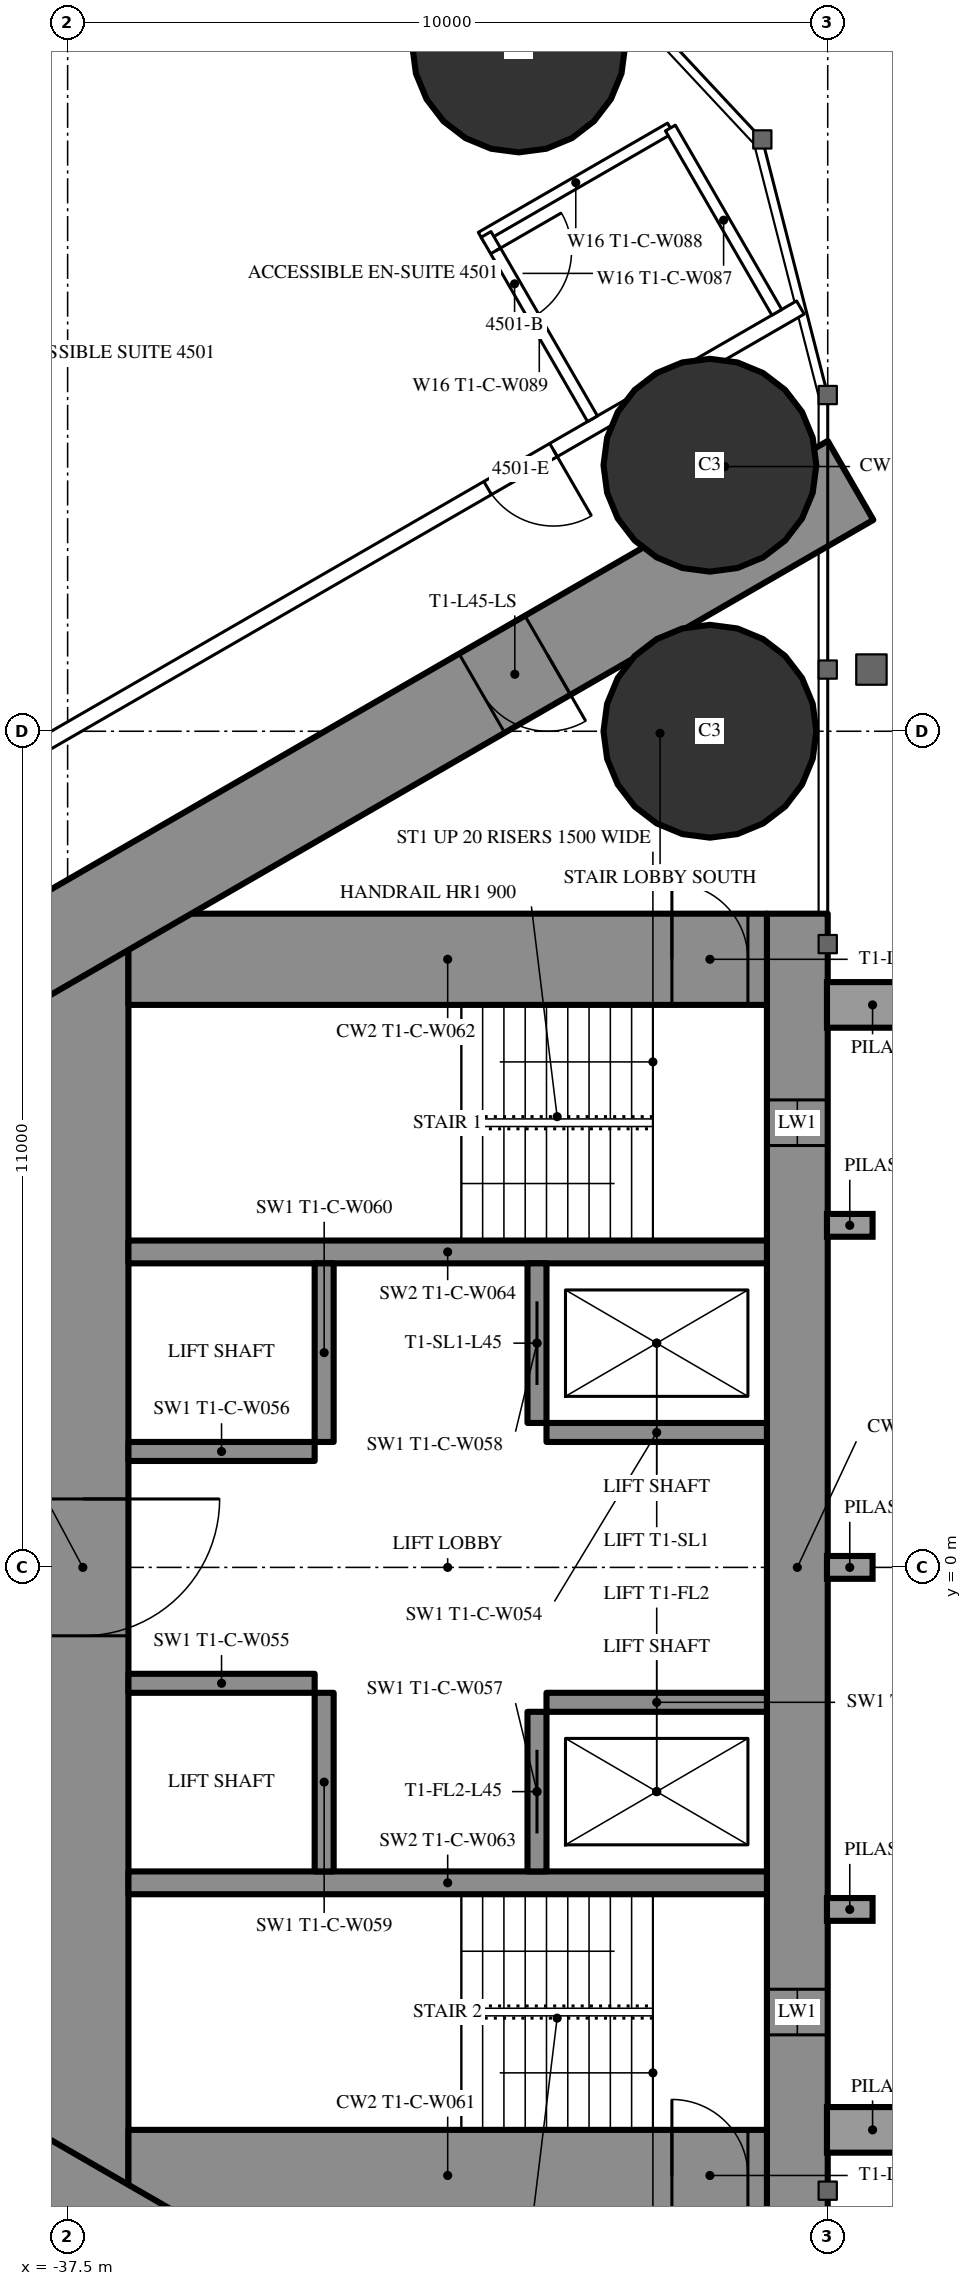
"""IFC4 building model, lengths in metres.
Left out: names, types, materials, properties, quantities, classifications, styles, units other than length and angle.
Written with IfcOpenShell. Run it as: python <this file> out.ifc"""

import sys

from ifc_helpers import new_model, si_unit, direction, frame, frame_2d, origin, origin_2d, place, context, subcontext, project, spatial, rectangle, circle, extrude, element, fill, save


model = new_model("IFC4")
c1 = context("Model", 3, precision=1e-05, world=origin(), true_north=direction((0.0, 1.0)))
c2 = subcontext(c1, "Body", "Model", "MODEL_VIEW")
j1 = project(units=[si_unit("LENGTHUNIT", "METRE"), si_unit("PLANEANGLEUNIT", "RADIAN")], contexts=[c1])
p1 = place(None, origin())
s1 = spatial("IfcSite", under=j1, at=p1, CompositionType="ELEMENT")
p2 = place(p1, origin())
s2 = spatial("IfcBuilding", under=s1, at=p2, CompositionType="ELEMENT")
p3 = place(p2, frame((0.0, 0.0, 170.3)))
s3 = spatial("IfcBuildingStorey", under=s2, at=p3, CompositionType="ELEMENT", Elevation=170.3)
for number, where, z_axis, x_axis in (
    (1, (-31.565, 20.016, 0.0), (0.0, 0.0, 1.0), (1.0, 0.0, 0.0)),
    (2, (-29.05, 11.0, 0.0), (0.0, 0.0, 1.0), (1.0, 0.0, 0.0)),
    (3, (-29.05, 14.5, 0.0), (0.0, 0.0, 1.0), (1.0, 0.0, 0.0)),
):
    element("IfcColumn", number, at=place(p3, frame(where, z_axis=z_axis, x_axis=x_axis)), inside=s3, PredefinedType="COLUMN", context=c2, shape_type="SweptSolid", body=[
        extrude(circle(Radius=1.4, at=origin_2d()), origin(), (0.0, 0.0, 1.0), 3.5),
    ])
p4 = place(p3, frame((-27.9, 8.6, 0.0), z_axis=(0.0, 0.0, 1.0), x_axis=(0.0, -1.0, 0.0)))
e4 = element("IfcWall", 4, at=p4, inside=s3, PredefinedType="SHEAR", context=c2, shape_type="SweptSolid", body=[
    extrude(rectangle(XDim=17.2, YDim=0.8, at=frame_2d((8.6, 0.0))), origin(), (0.0, 0.0, 1.0), 3.5),
])
p5 = place(p4, frame((2.45, 0.0, 0.6)))
e5 = element("IfcOpeningElement", 5, at=p5, cuts=e4, PredefinedType="OPENING", context=c2, shape_type="SweptSolid", body=[
    extrude(rectangle(XDim=0.6, YDim=2.1, at=frame_2d((0.3, 1.05))), frame((0.0, 0.41, 0.0), z_axis=(0.0, -1.0, 0.0), x_axis=(1.0, 0.0, 0.0)), (0.0, 0.0, 1.0), 0.82),
])
p6 = place(p4, frame((14.15, 0.0, 0.6)))
e6 = element("IfcOpeningElement", 6, at=p6, cuts=e4, PredefinedType="OPENING", context=c2, shape_type="SweptSolid", body=[
    extrude(rectangle(XDim=0.6, YDim=2.1, at=frame_2d((0.3, 1.05))), frame((0.0, 0.41, 0.0), z_axis=(0.0, -1.0, 0.0), x_axis=(1.0, 0.0, 0.0)), (0.0, 0.0, 1.0), 0.82),
])
p7 = place(p3, frame((-37.3, 8.6, 0.0), z_axis=(0.0, 0.0, 1.0), x_axis=(0.0, -1.0, 0.0)))
e7 = element("IfcWall", 7, at=p7, inside=s3, PredefinedType="SHEAR", context=c2, shape_type="SweptSolid", body=[
    extrude(rectangle(XDim=17.2, YDim=1.2, at=frame_2d((8.6, 0.0))), origin(), (0.0, 0.0, 1.0), 3.5),
])
p8 = place(p7, frame((7.7, 0.0, 0.0)))
e8 = element("IfcOpeningElement", 8, at=p8, cuts=e7, PredefinedType="OPENING", context=c2, shape_type="SweptSolid", body=[
    extrude(rectangle(XDim=1.8, YDim=2.2, at=frame_2d((0.9, 1.1))), frame((0.0, 0.61, 0.0), z_axis=(0.0, -1.0, 0.0), x_axis=(1.0, 0.0, 0.0)), (0.0, 0.0, 1.0), 1.22),
])
p9 = place(p3, frame((-28.3, 8.0, 0.0), z_axis=(0.0, 0.0, 1.0), x_axis=(-1.0, 0.0, 0.0)))
e9 = element("IfcWall", 9, at=p9, inside=s3, PredefinedType="SHEAR", context=c2, shape_type="SweptSolid", body=[
    extrude(rectangle(XDim=8.4, YDim=1.2, at=frame_2d((4.2, 0.0))), origin(), (0.0, 0.0, 1.0), 3.5),
])
p10 = place(p9, frame((0.25, 0.0, 0.0)))
e10 = element("IfcOpeningElement", 10, at=p10, cuts=e9, PredefinedType="OPENING", context=c2, shape_type="SweptSolid", body=[
    extrude(rectangle(XDim=1.0, YDim=2.2, at=frame_2d((0.5, 1.1))), frame((0.0, 0.61, 0.0), z_axis=(0.0, -1.0, 0.0), x_axis=(1.0, 0.0, 0.0)), (0.0, 0.0, 1.0), 1.22),
])
p11 = place(p3, frame((-28.3, -8.0, 0.0), z_axis=(0.0, 0.0, 1.0), x_axis=(-1.0, 0.0, 0.0)))
e11 = element("IfcWall", 11, at=p11, inside=s3, PredefinedType="SHEAR", context=c2, shape_type="SweptSolid", body=[
    extrude(rectangle(XDim=8.4, YDim=1.2, at=frame_2d((4.2, 0.0))), origin(), (0.0, 0.0, 1.0), 3.5),
])
p12 = place(p11, frame((0.25, 0.0, 0.0)))
e12 = element("IfcOpeningElement", 12, at=p12, cuts=e11, PredefinedType="OPENING", context=c2, shape_type="SweptSolid", body=[
    extrude(rectangle(XDim=1.0, YDim=2.2, at=frame_2d((0.5, 1.1))), frame((0.0, 0.61, 0.0), z_axis=(0.0, -1.0, 0.0), x_axis=(1.0, 0.0, 0.0)), (0.0, 0.0, 1.0), 1.22),
])
for number, where, z_axis, x_axis in (
    (13, (-28.3, 4.15, 0.0), (0.0, 0.0, 1.0), (-1.0, 0.0, 0.0)),
    (14, (-28.3, -4.15, 0.0), (0.0, 0.0, 1.0), (-1.0, 0.0, 0.0)),
):
    element("IfcWall", number, at=place(p3, frame(where, z_axis=z_axis, x_axis=x_axis)), inside=s3, PredefinedType="SHEAR", context=c2, shape_type="SweptSolid", body=[
        extrude(rectangle(XDim=8.4, YDim=0.3, at=frame_2d((4.2, 0.0))), origin(), (0.0, 0.0, 1.0), 3.5),
    ])
p13 = place(p3, frame((-31.325, 4.0, 0.0), z_axis=(0.0, 0.0, 1.0), x_axis=(0.0, -1.0, 0.0)))
e15 = element("IfcWall", 15, at=p13, inside=s3, PredefinedType="SHEAR", context=c2, shape_type="SweptSolid", body=[
    extrude(rectangle(XDim=2.1, YDim=0.25, at=frame_2d((1.05, 0.0))), origin(), (0.0, 0.0, 1.0), 3.5),
])
p14 = place(p13, frame((0.5, 0.0, 0.0)))
e16 = element("IfcOpeningElement", 16, at=p14, cuts=e15, PredefinedType="OPENING", context=c2, shape_type="SweptSolid", body=[
    extrude(rectangle(XDim=1.1, YDim=2.2, at=frame_2d((0.55, 1.1))), frame((0.0, 0.135, 0.0), z_axis=(0.0, -1.0, 0.0), x_axis=(1.0, 0.0, 0.0)), (0.0, 0.0, 1.0), 0.27),
])
p15 = place(p3, frame((-34.125, 4.0, 0.0), z_axis=(0.0, 0.0, 1.0), x_axis=(0.0, -1.0, 0.0)))
e17 = element("IfcWall", 17, at=p15, inside=s3, PredefinedType="SHEAR", context=c2, shape_type="SweptSolid", body=[
    extrude(rectangle(XDim=2.35, YDim=0.25, at=frame_2d((1.175, 0.0))), origin(), (0.0, 0.0, 1.0), 3.5),
])
p16 = place(p3, frame((-28.3, 1.775, 0.0), z_axis=(0.0, 0.0, 1.0), x_axis=(-1.0, 0.0, 0.0)))
e18 = element("IfcWall", 18, at=p16, inside=s3, PredefinedType="SHEAR", context=c2, shape_type="SweptSolid", body=[
    extrude(rectangle(XDim=2.9, YDim=0.25, at=frame_2d((1.45, 0.0))), origin(), (0.0, 0.0, 1.0), 3.5),
])
p17 = place(p3, frame((-34.25, 1.525, 0.0), z_axis=(0.0, 0.0, 1.0), x_axis=(-1.0, 0.0, 0.0)))
e19 = element("IfcWall", 19, at=p17, inside=s3, PredefinedType="SHEAR", context=c2, shape_type="SweptSolid", body=[
    extrude(rectangle(XDim=2.45, YDim=0.25, at=frame_2d((1.225, 0.0))), origin(), (0.0, 0.0, 1.0), 3.5),
])
p18 = place(p3, frame((-31.325, -1.9, 0.0), z_axis=(0.0, 0.0, 1.0), x_axis=(0.0, -1.0, 0.0)))
e20 = element("IfcWall", 20, at=p18, inside=s3, PredefinedType="SHEAR", context=c2, shape_type="SweptSolid", body=[
    extrude(rectangle(XDim=2.1, YDim=0.25, at=frame_2d((1.05, 0.0))), origin(), (0.0, 0.0, 1.0), 3.5),
])
p19 = place(p18, frame((0.5, 0.0, 0.0)))
e21 = element("IfcOpeningElement", 21, at=p19, cuts=e20, PredefinedType="OPENING", context=c2, shape_type="SweptSolid", body=[
    extrude(rectangle(XDim=1.1, YDim=2.2, at=frame_2d((0.55, 1.1))), frame((0.0, 0.135, 0.0), z_axis=(0.0, -1.0, 0.0), x_axis=(1.0, 0.0, 0.0)), (0.0, 0.0, 1.0), 0.27),
])
p20 = place(p3, frame((-34.125, -1.65, 0.0), z_axis=(0.0, 0.0, 1.0), x_axis=(0.0, -1.0, 0.0)))
e22 = element("IfcWall", 22, at=p20, inside=s3, PredefinedType="SHEAR", context=c2, shape_type="SweptSolid", body=[
    extrude(rectangle(XDim=2.35, YDim=0.25, at=frame_2d((1.175, 0.0))), origin(), (0.0, 0.0, 1.0), 3.5),
])
p21 = place(p3, frame((-28.3, -1.775, 0.0), z_axis=(0.0, 0.0, 1.0), x_axis=(-1.0, 0.0, 0.0)))
e23 = element("IfcWall", 23, at=p21, inside=s3, PredefinedType="SHEAR", context=c2, shape_type="SweptSolid", body=[
    extrude(rectangle(XDim=2.9, YDim=0.25, at=frame_2d((1.45, 0.0))), origin(), (0.0, 0.0, 1.0), 3.5),
])
p22 = place(p3, frame((-34.25, -1.525, 0.0), z_axis=(0.0, 0.0, 1.0), x_axis=(-1.0, 0.0, 0.0)))
e24 = element("IfcWall", 24, at=p22, inside=s3, PredefinedType="SHEAR", context=c2, shape_type="SweptSolid", body=[
    extrude(rectangle(XDim=2.45, YDim=0.25, at=frame_2d((1.225, 0.0))), origin(), (0.0, 0.0, 1.0), 3.5),
])
p23 = place(p3, frame((-27.2, 14.3, 0.0), z_axis=(0.0, 0.0, 1.0), x_axis=(-0.866026593062, -0.499997940104, 0.0)))
e25 = element("IfcWall", 25, at=p23, inside=s3, PredefinedType="SHEAR", context=c2, shape_type="SweptSolid", body=[
    extrude(rectangle(XDim=28.946, YDim=1.2, at=frame_2d((14.473, 0.0))), origin(), (0.0, 0.0, 1.0), 3.5),
])
p24 = place(p23, frame((4.6, 0.0, 0.0)))
e26 = element("IfcOpeningElement", 26, at=p24, cuts=e25, PredefinedType="OPENING", context=c2, shape_type="SweptSolid", body=[
    extrude(rectangle(XDim=1.0, YDim=2.2, at=frame_2d((0.5, 1.1))), frame((0.0, 0.61, 0.0), z_axis=(0.0, -1.0, 0.0), x_axis=(1.0, 0.0, 0.0)), (0.0, 0.0, 1.0), 1.22),
])
p25 = place(p23, frame((13.395, 0.0, 0.0)))
e27 = element("IfcOpeningElement", 27, at=p25, cuts=e25, PredefinedType="OPENING", context=c2, shape_type="SweptSolid", body=[
    extrude(rectangle(XDim=1.8, YDim=2.2, at=frame_2d((0.9, 1.1))), frame((0.0, 0.61, 0.0), z_axis=(0.0, -1.0, 0.0), x_axis=(1.0, 0.0, 0.0)), (0.0, 0.0, 1.0), 1.22),
])
p26 = place(p3, frame((-27.2, -14.3, 0.0), z_axis=(0.0, 0.0, 1.0), x_axis=(-0.866024021859, 0.500002393557, 0.0)))
e28 = element("IfcWall", 28, at=p26, inside=s3, PredefinedType="SHEAR", context=c2, shape_type="SweptSolid", body=[
    extrude(rectangle(XDim=27.907, YDim=1.2, at=frame_2d((13.954, 0.0))), origin(), (0.0, 0.0, 1.0), 3.5),
])
p27 = place(p26, frame((4.6, 0.0, 0.0)))
e29 = element("IfcOpeningElement", 29, at=p27, cuts=e28, PredefinedType="OPENING", context=c2, shape_type="SweptSolid", body=[
    extrude(rectangle(XDim=1.0, YDim=2.2, at=frame_2d((0.5, 1.1))), frame((0.0, 0.61, 0.0), z_axis=(0.0, -1.0, 0.0), x_axis=(1.0, 0.0, 0.0)), (0.0, 0.0, 1.0), 1.22),
])
p28 = place(p26, frame((13.395, 0.0, 0.0)))
e30 = element("IfcOpeningElement", 30, at=p28, cuts=e28, PredefinedType="OPENING", context=c2, shape_type="SweptSolid", body=[
    extrude(rectangle(XDim=1.8, YDim=2.2, at=frame_2d((0.9, 1.1))), frame((0.0, 0.61, 0.0), z_axis=(0.0, -1.0, 0.0), x_axis=(1.0, 0.0, 0.0)), (0.0, 0.0, 1.0), 1.22),
])
p29 = place(p3, frame((-27.86, 16.575, 0.0), z_axis=(0.0, 0.0, 1.0), x_axis=(-0.866025533911, -0.499999774615, 0.0)))
e31 = element("IfcWall", 31, at=p29, inside=s3, PredefinedType="PARTITIONING", context=c2, shape_type="SweptSolid", body=[
    extrude(rectangle(XDim=33.149, YDim=0.2, at=frame_2d((16.575, 0.0))), origin(), (0.0, 0.0, 1.0), 3.25),
])
p30 = place(p29, frame((3.75, 0.0, 0.0)))
e32 = element("IfcOpeningElement", 32, at=p30, cuts=e31, PredefinedType="OPENING", context=c2, shape_type="SweptSolid", body=[
    extrude(rectangle(XDim=1.0, YDim=2.2, at=frame_2d((0.5, 1.1))), frame((0.0, 0.11, 0.0), z_axis=(0.0, -1.0, 0.0), x_axis=(1.0, 0.0, 0.0)), (0.0, 0.0, 1.0), 0.22),
])
p31 = place(p29, frame((20.347, 0.0, 0.0)))
e33 = element("IfcOpeningElement", 33, at=p31, cuts=e31, PredefinedType="OPENING", context=c2, shape_type="SweptSolid", body=[
    extrude(rectangle(XDim=0.95, YDim=2.2, at=frame_2d((0.475, 1.1))), frame((0.0, 0.11, 0.0), z_axis=(0.0, -1.0, 0.0), x_axis=(1.0, 0.0, 0.0)), (0.0, 0.0, 1.0), 0.22),
])
p32 = place(p29, frame((24.397, 0.0, 0.0)))
e34 = element("IfcOpeningElement", 34, at=p32, cuts=e31, PredefinedType="OPENING", context=c2, shape_type="SweptSolid", body=[
    extrude(rectangle(XDim=0.95, YDim=2.2, at=frame_2d((0.475, 1.1))), frame((0.0, 0.11, 0.0), z_axis=(0.0, -1.0, 0.0), x_axis=(1.0, 0.0, 0.0)), (0.0, 0.0, 1.0), 0.22),
])
p33 = place(p29, frame((30.042, 0.0, 0.0)))
e35 = element("IfcOpeningElement", 35, at=p33, cuts=e31, PredefinedType="OPENING", context=c2, shape_type="SweptSolid", body=[
    extrude(rectangle(XDim=0.95, YDim=2.2, at=frame_2d((0.475, 1.1))), frame((0.0, 0.11, 0.0), z_axis=(0.0, -1.0, 0.0), x_axis=(1.0, 0.0, 0.0)), (0.0, 0.0, 1.0), 0.22),
])
p34 = place(p3, frame((-29.57, 18.936, 0.0), z_axis=(0.0, 0.0, 1.0), x_axis=(-0.866018712932, -0.500011588718, 0.0)))
e36 = element("IfcWall", 36, at=p34, inside=s3, PredefinedType="PARTITIONING", context=c2, shape_type="SweptSolid", body=[
    extrude(rectangle(XDim=2.875, YDim=0.15, at=frame_2d((1.438, 0.0))), origin(), (0.0, 0.0, 1.0), 3.25),
])
p35 = place(p3, frame((-30.595, 15.111, 0.0), z_axis=(0.0, 0.0, 1.0), x_axis=(-0.49998411664, 0.866034573852, 0.0)))
e37 = element("IfcWall", 37, at=p35, inside=s3, PredefinedType="PARTITIONING", context=c2, shape_type="SweptSolid", body=[
    extrude(rectangle(XDim=2.8, YDim=0.15, at=frame_2d((1.4, 0.0))), origin(), (0.0, 0.0, 1.0), 3.25),
])
p36 = place(p35, frame((1.55, 0.0, 0.0)))
e38 = element("IfcOpeningElement", 38, at=p36, cuts=e37, PredefinedType="OPENING", context=c2, shape_type="SweptSolid", body=[
    extrude(rectangle(XDim=1.0, YDim=2.2, at=frame_2d((0.5, 1.1))), frame((0.0, 0.085, 0.0), z_axis=(0.0, -1.0, 0.0), x_axis=(1.0, 0.0, 0.0)), (0.0, 0.0, 1.0), 0.17),
])
p37 = place(p3, frame((-28.17, 16.511, 0.0), z_axis=(0.0, 0.0, 1.0), x_axis=(-0.49994636267, 0.866056369097, 0.0)))
e39 = element("IfcWall", 39, at=p37, inside=s3, PredefinedType="PARTITIONING", context=c2, shape_type="SweptSolid", body=[
    extrude(rectangle(XDim=2.8, YDim=0.15, at=frame_2d((1.4, 0.0))), origin(), (0.0, 0.0, 1.0), 3.25),
])
p38 = place(p36, origin())
e40 = element("IfcDoor", 40, at=p38, inside=s3, OperationType="SINGLE_SWING_RIGHT", PredefinedType="DOOR", context=c2, shape_type="SweptSolid", body=[
    extrude(rectangle(XDim=1.0, YDim=2.2, at=frame_2d((0.5, 1.1))), frame((0.0, 0.025, 0.0), z_axis=(0.0, -1.0, 0.0), x_axis=(1.0, 0.0, 0.0)), (0.0, 0.0, 1.0), 0.05),
])
fill(e38, e40)
p39 = place(p30, origin())
e41 = element("IfcDoor", 41, at=p39, inside=s3, OperationType="SINGLE_SWING_LEFT", PredefinedType="DOOR", context=c2, shape_type="SweptSolid", body=[
    extrude(rectangle(XDim=1.0, YDim=2.2, at=frame_2d((0.5, 1.1))), frame((0.0, 0.025, 0.0), z_axis=(0.0, -1.0, 0.0), x_axis=(1.0, 0.0, 0.0)), (0.0, 0.0, 1.0), 0.05),
])
fill(e32, e41)
p40 = place(p24, origin())
e42 = element("IfcDoor", 42, at=p40, inside=s3, OperationType="SINGLE_SWING_LEFT", PredefinedType="DOOR", context=c2, shape_type="SweptSolid", body=[
    extrude(rectangle(XDim=1.0, YDim=2.2, at=frame_2d((0.5, 1.1))), frame((0.0, 0.025, 0.0), z_axis=(0.0, -1.0, 0.0), x_axis=(1.0, 0.0, 0.0)), (0.0, 0.0, 1.0), 0.05),
])
fill(e26, e42)
p41 = place(p8, origin())
e43 = element("IfcDoor", 43, at=p41, inside=s3, OperationType="DOUBLE_DOOR_SINGLE_SWING", PredefinedType="DOOR", context=c2, shape_type="SweptSolid", body=[
    extrude(rectangle(XDim=1.8, YDim=2.2, at=frame_2d((0.9, 1.1))), frame((0.0, 0.025, 0.0), z_axis=(0.0, -1.0, 0.0), x_axis=(1.0, 0.0, 0.0)), (0.0, 0.0, 1.0), 0.05),
])
fill(e8, e43)
p42 = place(p10, origin())
e44 = element("IfcDoor", 44, at=p42, inside=s3, OperationType="SINGLE_SWING_RIGHT", PredefinedType="DOOR", context=c2, shape_type="SweptSolid", body=[
    extrude(rectangle(XDim=1.0, YDim=2.2, at=frame_2d((0.5, 1.1))), frame((0.0, 0.025, 0.0), z_axis=(0.0, -1.0, 0.0), x_axis=(1.0, 0.0, 0.0)), (0.0, 0.0, 1.0), 0.05),
])
fill(e10, e44)
p43 = place(p12, origin())
e45 = element("IfcDoor", 45, at=p43, inside=s3, OperationType="SINGLE_SWING_RIGHT", PredefinedType="DOOR", context=c2, shape_type="SweptSolid", body=[
    extrude(rectangle(XDim=1.0, YDim=2.2, at=frame_2d((0.5, 1.1))), frame((0.0, 0.025, 0.0), z_axis=(0.0, -1.0, 0.0), x_axis=(1.0, 0.0, 0.0)), (0.0, 0.0, 1.0), 0.05),
])
fill(e12, e45)
p44 = place(p14, origin())
e46 = element("IfcDoor", 46, at=p44, inside=s3, OperationType="SLIDING_TO_LEFT", PredefinedType="USERDEFINED", context=c2, shape_type="SweptSolid", body=[
    extrude(rectangle(XDim=1.1, YDim=2.2, at=frame_2d((0.55, 1.1))), frame((0.0, 0.025, 0.0), z_axis=(0.0, -1.0, 0.0), x_axis=(1.0, 0.0, 0.0)), (0.0, 0.0, 1.0), 0.05),
])
fill(e16, e46)
p45 = place(p19, origin())
e47 = element("IfcDoor", 47, at=p45, inside=s3, OperationType="SLIDING_TO_LEFT", PredefinedType="USERDEFINED", context=c2, shape_type="SweptSolid", body=[
    extrude(rectangle(XDim=1.1, YDim=2.2, at=frame_2d((0.55, 1.1))), frame((0.0, 0.025, 0.0), z_axis=(0.0, -1.0, 0.0), x_axis=(1.0, 0.0, 0.0)), (0.0, 0.0, 1.0), 0.05),
])
fill(e21, e47)
p46 = place(p5, origin())
e48 = element("IfcWindow", 48, at=p46, inside=s3, PartitioningType="SINGLE_PANEL", PredefinedType="WINDOW", context=c2, shape_type="SweptSolid", body=[
    extrude(rectangle(XDim=0.6, YDim=2.1, at=frame_2d((0.3, 1.05))), frame((0.0, 0.03, 0.0), z_axis=(0.0, -1.0, 0.0), x_axis=(1.0, 0.0, 0.0)), (0.0, 0.0, 1.0), 0.06),
])
fill(e5, e48)
p47 = place(p6, origin())
e49 = element("IfcWindow", 49, at=p47, inside=s3, PartitioningType="SINGLE_PANEL", PredefinedType="WINDOW", context=c2, shape_type="SweptSolid", body=[
    extrude(rectangle(XDim=0.6, YDim=2.1, at=frame_2d((0.3, 1.05))), frame((0.0, 0.03, 0.0), z_axis=(0.0, -1.0, 0.0), x_axis=(1.0, 0.0, 0.0)), (0.0, 0.0, 1.0), 0.06),
])
fill(e6, e49)
save(model, sys.argv[1])
